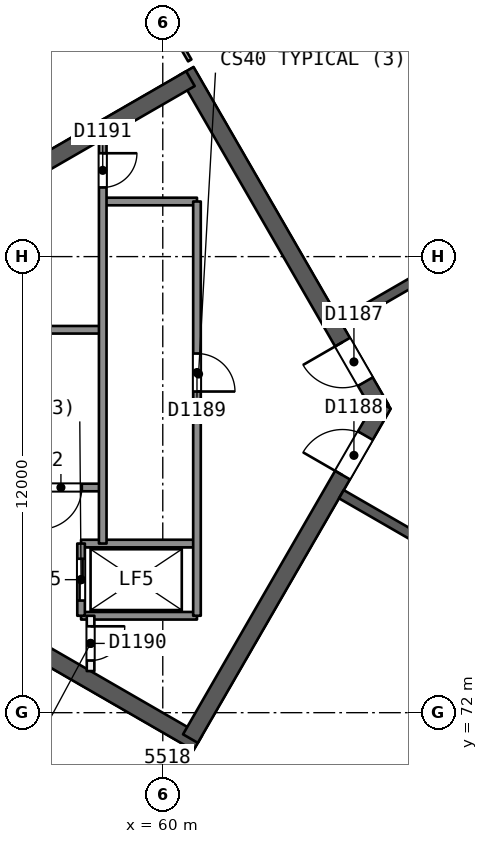
"""IFC4 building model, lengths in metres.
Left out: names, types, materials, properties, quantities, classifications, styles, units other than length and angle.
Written with IfcOpenShell. Run it as: python <this file> out.ifc"""

import sys

from ifc_helpers import new_model, si_unit, direction, frame, frame_2d, origin, place, context, subcontext, project, spatial, rectangle, extrude, element, fill, save


model = new_model("IFC4")
c1 = context("Model", 3, precision=1e-05, world=origin(), true_north=direction((0.0, 1.0)))
c2 = subcontext(c1, "Body", "Model", "MODEL_VIEW")
j1 = project(units=[si_unit("LENGTHUNIT", "METRE"), si_unit("PLANEANGLEUNIT", "RADIAN")], contexts=[c1])
p1 = place(None, origin())
s1 = spatial("IfcSite", under=j1, at=p1, CompositionType="ELEMENT")
p2 = place(p1, origin())
s2 = spatial("IfcBuilding", under=s1, at=p2, CompositionType="ELEMENT")
p3 = place(p2, frame((0.0, 0.0, 224.3)))
s3 = spatial("IfcBuildingStorey", under=s2, at=p3, CompositionType="ELEMENT", Elevation=224.3)
p4 = place(p3, frame((65.74, 80.0, 0.0), z_axis=(0.0, 0.0, 1.0), x_axis=(-0.499991857942, 0.866030104553, 0.0)))
e1 = element("IfcWall", 1, at=p4, inside=s3, PredefinedType="SHEAR", context=c2, shape_type="SweptSolid", body=[
    extrude(rectangle(XDim=10.25, YDim=0.45, at=frame_2d((5.125, 0.0))), origin(), (0.0, 0.0, 1.0), 3.7),
])
p5 = place(p4, frame((0.82, 0.0, 0.0)))
e2 = element("IfcOpeningElement", 2, at=p5, cuts=e1, PredefinedType="OPENING", context=c2, shape_type="SweptSolid", body=[
    extrude(rectangle(XDim=1.2, YDim=2.1, at=frame_2d((0.6, 1.05))), frame((0.0, 0.235, 0.0), z_axis=(0.0, -1.0, 0.0), x_axis=(1.0, 0.0, 0.0)), (0.0, 0.0, 1.0), 0.471),
])
p6 = place(p3, frame((60.728, 88.682, 0.0), z_axis=(0.0, 0.0, 1.0), x_axis=(-0.866021613849, -0.500006564303, 0.0)))
e3 = element("IfcWall", 3, at=p6, inside=s3, PredefinedType="SHEAR", context=c2, shape_type="SweptSolid", body=[
    extrude(rectangle(XDim=14.108, YDim=0.45, at=frame_2d((7.054, 0.0))), origin(), (0.0, 0.0, 1.0), 3.7),
])
p7 = place(p3, frame((48.622, 78.307, 0.0), z_axis=(0.0, 0.0, 1.0), x_axis=(0.86602701116, -0.499997215934, 0.0)))
e4 = element("IfcWall", 4, at=p7, inside=s3, PredefinedType="SHEAR", context=c2, shape_type="SweptSolid", body=[
    extrude(rectangle(XDim=14.204, YDim=0.45, at=frame_2d((7.102, 0.0))), origin(), (0.0, 0.0, 1.0), 3.7),
])
p8 = place(p3, frame((60.728, 71.318, 0.0), z_axis=(0.0, 0.0, 1.0), x_axis=(0.500012416173, 0.866018235185, 0.0)))
e5 = element("IfcWall", 5, at=p8, inside=s3, PredefinedType="SHEAR", context=c2, shape_type="SweptSolid", body=[
    extrude(rectangle(XDim=10.155, YDim=0.45, at=frame_2d((5.078, 0.0))), origin(), (0.0, 0.0, 1.0), 3.7),
])
p9 = place(p8, frame((8.005, 0.0, 0.0)))
e6 = element("IfcOpeningElement", 6, at=p9, cuts=e5, PredefinedType="OPENING", context=c2, shape_type="SweptSolid", body=[
    extrude(rectangle(XDim=1.2, YDim=2.1, at=frame_2d((0.6, 1.05))), frame((0.0, 0.235, 0.0), z_axis=(0.0, -1.0, 0.0), x_axis=(1.0, 0.0, 0.0)), (0.0, 0.0, 1.0), 0.471),
])
p10 = place(p3, frame((78.2, 90.046, 0.0), z_axis=(0.0, 0.0, 1.0), x_axis=(-0.866026492143, -0.499998114903, 0.0)))
e7 = element("IfcWall", 7, at=p10, inside=s3, PredefinedType="SHEAR", context=c2, shape_type="SweptSolid", body=[
    extrude(rectangle(XDim=15.588, YDim=0.25, at=frame_2d((7.794, 0.0))), origin(), (0.0, 0.0, 1.0), 3.3),
])
p11 = place(p10, frame((2.15, 0.0, 0.0)))
e8 = element("IfcOpeningElement", 8, at=p11, cuts=e7, PredefinedType="OPENING", context=c2, shape_type="SweptSolid", body=[
    extrude(rectangle(XDim=1.0, YDim=2.1, at=frame_2d((0.5, 1.05))), frame((0.0, 0.135, 0.0), z_axis=(0.0, -1.0, 0.0), x_axis=(1.0, 0.0, 0.0)), (0.0, 0.0, 1.0), 0.271),
])
p12 = place(p10, frame((8.538, 0.0, 0.0)))
e9 = element("IfcOpeningElement", 9, at=p12, cuts=e7, PredefinedType="OPENING", context=c2, shape_type="SweptSolid", body=[
    extrude(rectangle(XDim=1.1, YDim=2.1, at=frame_2d((0.55, 1.05))), frame((0.0, 0.135, 0.0), z_axis=(0.0, -1.0, 0.0), x_axis=(1.0, 0.0, 0.0)), (0.0, 0.0, 1.0), 0.271),
])
p13 = place(p10, frame((12.282, 0.0, 0.0)))
e10 = element("IfcOpeningElement", 10, at=p13, cuts=e7, PredefinedType="OPENING", context=c2, shape_type="SweptSolid", body=[
    extrude(rectangle(XDim=1.0, YDim=2.1, at=frame_2d((0.5, 1.05))), frame((0.0, 0.135, 0.0), z_axis=(0.0, -1.0, 0.0), x_axis=(1.0, 0.0, 0.0)), (0.0, 0.0, 1.0), 0.271),
])
p14 = place(p3, frame((64.7, 77.748, 0.0), z_axis=(0.0, 0.0, 1.0), x_axis=(0.866026492143, -0.499998114903, 0.0)))
e11 = element("IfcWall", 11, at=p14, inside=s3, PredefinedType="SHEAR", context=c2, shape_type="SweptSolid", body=[
    extrude(rectangle(XDim=15.588, YDim=0.25, at=frame_2d((7.794, 0.0))), origin(), (0.0, 0.0, 1.0), 3.3),
])
p15 = place(p14, frame((2.462, 0.0, 0.0)))
e12 = element("IfcOpeningElement", 12, at=p15, cuts=e11, PredefinedType="OPENING", context=c2, shape_type="SweptSolid", body=[
    extrude(rectangle(XDim=1.0, YDim=2.1, at=frame_2d((0.5, 1.05))), frame((0.0, 0.135, 0.0), z_axis=(0.0, -1.0, 0.0), x_axis=(1.0, 0.0, 0.0)), (0.0, 0.0, 1.0), 0.271),
])
p16 = place(p14, frame((9.474, 0.0, 0.0)))
e13 = element("IfcOpeningElement", 13, at=p16, cuts=e11, PredefinedType="OPENING", context=c2, shape_type="SweptSolid", body=[
    extrude(rectangle(XDim=1.1, YDim=2.1, at=frame_2d((0.55, 1.05))), frame((0.0, 0.135, 0.0), z_axis=(0.0, -1.0, 0.0), x_axis=(1.0, 0.0, 0.0)), (0.0, 0.0, 1.0), 0.271),
])
p17 = place(p14, frame((12.906, 0.0, 0.0)))
e14 = element("IfcOpeningElement", 14, at=p17, cuts=e11, PredefinedType="OPENING", context=c2, shape_type="SweptSolid", body=[
    extrude(rectangle(XDim=1.0, YDim=2.1, at=frame_2d((0.5, 1.05))), frame((0.0, 0.135, 0.0), z_axis=(0.0, -1.0, 0.0), x_axis=(1.0, 0.0, 0.0)), (0.0, 0.0, 1.0), 0.271),
])
p18 = place(p3, frame((64.396, 94.002, 0.0), z_axis=(0.0, 0.0, 1.0), x_axis=(0.50001095942, -0.866019076268, 0.0)))
e15 = element("IfcWall", 15, at=p18, inside=s3, PredefinedType="PARTITIONING", context=c2, shape_type="SweptSolid", body=[
    extrude(rectangle(XDim=10.328, YDim=0.2, at=frame_2d((5.164, 0.0))), origin(), (0.0, 0.0, 1.0), 3.3),
])
p19 = place(p3, frame((59.536, 91.196, 0.0), z_axis=(0.0, 0.0, 1.0), x_axis=(0.499950341091, -0.86605407247, 0.0)))
e16 = element("IfcWall", 16, at=p19, inside=s3, PredefinedType="PARTITIONING", context=c2, shape_type="SweptSolid", body=[
    extrude(rectangle(XDim=2.349, YDim=0.1, at=frame_2d((1.175, 0.0))), origin(), (0.0, 0.0, 1.0), 3.3),
])
p20 = place(p19, frame((0.725, 0.0, 0.0)))
e17 = element("IfcOpeningElement", 17, at=p20, cuts=e16, PredefinedType="OPENING", context=c2, shape_type="SweptSolid", body=[
    extrude(rectangle(XDim=0.9, YDim=2.1, at=frame_2d((0.45, 1.05))), frame((0.0, 0.061, 0.0), z_axis=(0.0, -1.0, 0.0), x_axis=(1.0, 0.0, 0.0)), (0.0, 0.0, 1.0), 0.121),
])
p21 = place(p3, frame((60.71, 70.838, 0.0), z_axis=(0.0, 0.0, 1.0), x_axis=(-0.499950341091, -0.86605407247, 0.0)))
e18 = element("IfcWall", 18, at=p21, inside=s3, PredefinedType="PARTITIONING", context=c2, shape_type="SweptSolid", body=[
    extrude(rectangle(XDim=2.349, YDim=0.1, at=frame_2d((1.175, 0.0))), origin(), (0.0, 0.0, 1.0), 3.3),
])
p22 = place(p21, frame((0.725, 0.0, 0.0)))
e19 = element("IfcOpeningElement", 19, at=p22, cuts=e18, PredefinedType="OPENING", context=c2, shape_type="SweptSolid", body=[
    extrude(rectangle(XDim=0.9, YDim=2.1, at=frame_2d((0.45, 1.05))), frame((0.0, 0.061, 0.0), z_axis=(0.0, -1.0, 0.0), x_axis=(1.0, 0.0, 0.0)), (0.0, 0.0, 1.0), 0.121),
])
p23 = place(p3, frame((64.666, 65.842, 0.0), z_axis=(0.0, 0.0, 1.0), x_axis=(0.500019482754, 0.866014155119, 0.0)))
e20 = element("IfcWall", 20, at=p23, inside=s3, PredefinedType="PARTITIONING", context=c2, shape_type="SweptSolid", body=[
    extrude(rectangle(XDim=7.328, YDim=0.2, at=frame_2d((3.664, 0.0))), origin(), (0.0, 0.0, 1.0), 3.3),
])
p24 = place(p3, frame((44.324, 82.585, 0.0), z_axis=(0.0, 0.0, 1.0), x_axis=(0.86602584856, 0.499999229625, 0.0)))
e21 = element("IfcWall", 21, at=p24, inside=s3, PredefinedType="SOLIDWALL", context=c2, shape_type="SweptSolid", body=[
    extrude(rectangle(XDim=50.547, YDim=0.3, at=frame_2d((25.274, 0.0))), origin(), (0.0, 0.0, 1.0), 3.3),
])
p25 = place(p24, frame((24.23, 0.0, 0.0)))
e22 = element("IfcOpeningElement", 22, at=p25, cuts=e21, PredefinedType="OPENING", context=c2, shape_type="SweptSolid", body=[
    extrude(rectangle(XDim=2.4, YDim=2.4, at=frame_2d((1.2, 1.2))), frame((0.0, 0.161, 0.0), z_axis=(0.0, -1.0, 0.0), x_axis=(1.0, 0.0, 0.0)), (0.0, 0.0, 1.0), 0.321),
])
p26 = place(p24, frame((29.218, 0.0, 0.0)))
e23 = element("IfcOpeningElement", 23, at=p26, cuts=e21, PredefinedType="OPENING", context=c2, shape_type="SweptSolid", body=[
    extrude(rectangle(XDim=2.4, YDim=2.4, at=frame_2d((1.2, 1.2))), frame((0.0, 0.161, 0.0), z_axis=(0.0, -1.0, 0.0), x_axis=(1.0, 0.0, 0.0)), (0.0, 0.0, 1.0), 0.321),
])
p27 = place(p24, frame((39.328, 0.0, 0.0)))
e24 = element("IfcOpeningElement", 24, at=p27, cuts=e21, PredefinedType="OPENING", context=c2, shape_type="SweptSolid", body=[
    extrude(rectangle(XDim=2.4, YDim=2.4, at=frame_2d((1.2, 1.2))), frame((0.0, 0.161, 0.0), z_axis=(0.0, -1.0, 0.0), x_axis=(1.0, 0.0, 0.0)), (0.0, 0.0, 1.0), 0.321),
])
p28 = place(p24, frame((19.085, 0.0, 0.0)))
e25 = element("IfcOpeningElement", 25, at=p28, cuts=e21, PredefinedType="OPENING", context=c2, shape_type="SweptSolid", body=[
    extrude(rectangle(XDim=2.4, YDim=2.4, at=frame_2d((1.2, 1.2))), frame((0.0, 0.161, 0.0), z_axis=(0.0, -1.0, 0.0), x_axis=(1.0, 0.0, 0.0)), (0.0, 0.0, 1.0), 0.321),
])
p29 = place(p24, frame((8.771, 0.0, 0.0)))
e26 = element("IfcOpeningElement", 26, at=p29, cuts=e21, PredefinedType="OPENING", context=c2, shape_type="SweptSolid", body=[
    extrude(rectangle(XDim=2.4, YDim=2.4, at=frame_2d((1.2, 1.2))), frame((0.0, 0.161, 0.0), z_axis=(0.0, -1.0, 0.0), x_axis=(1.0, 0.0, 0.0)), (0.0, 0.0, 1.0), 0.321),
])
p30 = place(p3, frame((88.099, 52.141, 0.0), z_axis=(0.0, 0.0, 1.0), x_axis=(-0.86602584856, 0.499999229625, 0.0)))
e27 = element("IfcWall", 27, at=p30, inside=s3, PredefinedType="SOLIDWALL", context=c2, shape_type="SweptSolid", body=[
    extrude(rectangle(XDim=50.547, YDim=0.3, at=frame_2d((25.274, 0.0))), origin(), (0.0, 0.0, 1.0), 3.3),
])
p31 = place(p30, frame((23.294, 0.0, 0.0)))
e28 = element("IfcOpeningElement", 28, at=p31, cuts=e27, PredefinedType="OPENING", context=c2, shape_type="SweptSolid", body=[
    extrude(rectangle(XDim=2.4, YDim=2.4, at=frame_2d((1.2, 1.2))), frame((0.0, 0.161, 0.0), z_axis=(0.0, -1.0, 0.0), x_axis=(1.0, 0.0, 0.0)), (0.0, 0.0, 1.0), 0.321),
])
p32 = place(p30, frame((28.906, 0.0, 0.0)))
e29 = element("IfcOpeningElement", 29, at=p32, cuts=e27, PredefinedType="OPENING", context=c2, shape_type="SweptSolid", body=[
    extrude(rectangle(XDim=2.4, YDim=2.4, at=frame_2d((1.2, 1.2))), frame((0.0, 0.161, 0.0), z_axis=(0.0, -1.0, 0.0), x_axis=(1.0, 0.0, 0.0)), (0.0, 0.0, 1.0), 0.321),
])
p33 = place(p30, frame((39.328, 0.0, 0.0)))
e30 = element("IfcOpeningElement", 30, at=p33, cuts=e27, PredefinedType="OPENING", context=c2, shape_type="SweptSolid", body=[
    extrude(rectangle(XDim=2.4, YDim=2.4, at=frame_2d((1.2, 1.2))), frame((0.0, 0.161, 0.0), z_axis=(0.0, -1.0, 0.0), x_axis=(1.0, 0.0, 0.0)), (0.0, 0.0, 1.0), 0.321),
])
p34 = place(p30, frame((18.462, 0.0, 0.0)))
e31 = element("IfcOpeningElement", 31, at=p34, cuts=e27, PredefinedType="OPENING", context=c2, shape_type="SweptSolid", body=[
    extrude(rectangle(XDim=2.4, YDim=2.4, at=frame_2d((1.2, 1.2))), frame((0.0, 0.161, 0.0), z_axis=(0.0, -1.0, 0.0), x_axis=(1.0, 0.0, 0.0)), (0.0, 0.0, 1.0), 0.321),
])
p35 = place(p30, frame((8.771, 0.0, 0.0)))
e32 = element("IfcOpeningElement", 32, at=p35, cuts=e27, PredefinedType="OPENING", context=c2, shape_type="SweptSolid", body=[
    extrude(rectangle(XDim=2.4, YDim=2.4, at=frame_2d((1.2, 1.2))), frame((0.0, 0.161, 0.0), z_axis=(0.0, -1.0, 0.0), x_axis=(1.0, 0.0, 0.0)), (0.0, 0.0, 1.0), 0.321),
])
p36 = place(p3, frame((60.9, 85.45, 0.0), z_axis=(0.0, 0.0, 1.0), x_axis=(-1.0, 0.0, 0.0)))
e33 = element("IfcWall", 33, at=p36, inside=s3, PredefinedType="SOLIDWALL", context=c2, shape_type="SweptSolid", body=[
    extrude(rectangle(XDim=2.48, YDim=0.2, at=frame_2d((1.24, 0.0))), origin(), (0.0, 0.0, 1.0), 3.3),
])
p37 = place(p3, frame((58.42, 82.075, 0.0), z_axis=(0.0, 0.0, 1.0), x_axis=(-1.0, 0.0, 0.0)))
e34 = element("IfcWall", 34, at=p37, inside=s3, PredefinedType="SOLIDWALL", context=c2, shape_type="SweptSolid", body=[
    extrude(rectangle(XDim=7.7, YDim=0.2, at=frame_2d((3.85, 0.0))), origin(), (0.0, 0.0, 1.0), 3.3),
])
p38 = place(p3, frame((58.42, 77.925, 0.0), z_axis=(0.0, 0.0, 1.0), x_axis=(-1.0, 0.0, 0.0)))
e35 = element("IfcWall", 35, at=p38, inside=s3, PredefinedType="SOLIDWALL", context=c2, shape_type="SweptSolid", body=[
    extrude(rectangle(XDim=7.7, YDim=0.2, at=frame_2d((3.85, 0.0))), origin(), (0.0, 0.0, 1.0), 3.3),
])
p39 = place(p38, frame((0.55, 0.0, 0.0)))
e36 = element("IfcOpeningElement", 36, at=p39, cuts=e35, PredefinedType="OPENING", context=c2, shape_type="SweptSolid", body=[
    extrude(rectangle(XDim=1.1, YDim=2.1, at=frame_2d((0.55, 1.05))), frame((0.0, 0.11, 0.0), z_axis=(0.0, -1.0, 0.0), x_axis=(1.0, 0.0, 0.0)), (0.0, 0.0, 1.0), 0.221),
])
for number, where, z_axis, x_axis in (
    (37, (60.9, 76.45, 0.0), (0.0, 0.0, 1.0), (-1.0, 0.0, 0.0)),
    (38, (60.9, 74.55, 0.0), (0.0, 0.0, 1.0), (-1.0, 0.0, 0.0)),
):
    element("IfcWall", number, at=place(p3, frame(where, z_axis=z_axis, x_axis=x_axis)), inside=s3, PredefinedType="SOLIDWALL", context=c2, shape_type="SweptSolid", body=[
        extrude(rectangle(XDim=3.05, YDim=0.2, at=frame_2d((1.525, 0.0))), origin(), (0.0, 0.0, 1.0), 3.3),
    ])
p40 = place(p3, frame((60.9, 85.45, 0.0), z_axis=(0.0, 0.0, 1.0), x_axis=(0.0, -1.0, 0.0)))
e39 = element("IfcWall", 39, at=p40, inside=s3, PredefinedType="SOLIDWALL", context=c2, shape_type="SweptSolid", body=[
    extrude(rectangle(XDim=10.9, YDim=0.2, at=frame_2d((5.45, 0.0))), origin(), (0.0, 0.0, 1.0), 3.3),
])
p41 = place(p40, frame((4.0, 0.0, 0.0)))
e40 = element("IfcOpeningElement", 40, at=p41, cuts=e39, PredefinedType="OPENING", context=c2, shape_type="SweptSolid", body=[
    extrude(rectangle(XDim=1.0, YDim=2.1, at=frame_2d((0.5, 1.05))), frame((0.0, 0.11, 0.0), z_axis=(0.0, -1.0, 0.0), x_axis=(1.0, 0.0, 0.0)), (0.0, 0.0, 1.0), 0.221),
])
p42 = place(p3, frame((58.42, 87.09, 0.0), z_axis=(0.0, 0.0, 1.0), x_axis=(0.0, -1.0, 0.0)))
e41 = element("IfcWall", 41, at=p42, inside=s3, PredefinedType="SOLIDWALL", context=c2, shape_type="SweptSolid", body=[
    extrude(rectangle(XDim=10.64, YDim=0.2, at=frame_2d((5.32, 0.0))), origin(), (0.0, 0.0, 1.0), 3.3),
])
p43 = place(p42, frame((0.37, 0.0, 0.0)))
e42 = element("IfcOpeningElement", 42, at=p43, cuts=e41, PredefinedType="OPENING", context=c2, shape_type="SweptSolid", body=[
    extrude(rectangle(XDim=0.9, YDim=2.1, at=frame_2d((0.45, 1.05))), frame((0.0, 0.11, 0.0), z_axis=(0.0, -1.0, 0.0), x_axis=(1.0, 0.0, 0.0)), (0.0, 0.0, 1.0), 0.221),
])
p44 = place(p3, frame((58.1, 74.55, 0.0), z_axis=(0.0, 0.0, 1.0), x_axis=(0.0, -1.0, 0.0)))
e43 = element("IfcWall", 43, at=p44, inside=s3, PredefinedType="PARTITIONING", context=c2, shape_type="SweptSolid", body=[
    extrude(rectangle(XDim=1.455, YDim=0.2, at=frame_2d((0.728, 0.0))), origin(), (0.0, 0.0, 1.0), 3.3),
])
p45 = place(p44, frame((0.278, 0.0, 0.0)))
e44 = element("IfcOpeningElement", 44, at=p45, cuts=e43, PredefinedType="OPENING", context=c2, shape_type="SweptSolid", body=[
    extrude(rectangle(XDim=0.9, YDim=2.1, at=frame_2d((0.45, 1.05))), frame((0.0, 0.11, 0.0), z_axis=(0.0, -1.0, 0.0), x_axis=(1.0, 0.0, 0.0)), (0.0, 0.0, 1.0), 0.221),
])
p46 = place(p3, frame((57.85, 76.45, 0.0), z_axis=(0.0, 0.0, 1.0), x_axis=(0.0, -1.0, 0.0)))
e45 = element("IfcWall", 45, at=p46, inside=s3, PredefinedType="SOLIDWALL", context=c2, shape_type="SweptSolid", body=[
    extrude(rectangle(XDim=1.9, YDim=0.2, at=frame_2d((0.95, 0.0))), origin(), (0.0, 0.0, 1.0), 3.3),
])
p47 = place(p46, frame((0.4, 0.0, 0.0)))
e46 = element("IfcOpeningElement", 46, at=p47, cuts=e45, PredefinedType="OPENING", context=c2, shape_type="SweptSolid", body=[
    extrude(rectangle(XDim=1.1, YDim=2.1, at=frame_2d((0.55, 1.05))), frame((0.0, 0.11, 0.0), z_axis=(0.0, -1.0, 0.0), x_axis=(1.0, 0.0, 0.0)), (0.0, 0.0, 1.0), 0.221),
])
p48 = place(p5, origin())
e47 = element("IfcDoor", 47, at=p48, inside=s3, OperationType="SINGLE_SWING_RIGHT", PredefinedType="NOTDEFINED", context=c2, shape_type="SweptSolid", body=[
    extrude(rectangle(XDim=1.2, YDim=2.1, at=frame_2d((0.6, 1.05))), frame((0.0, 0.025, 0.0), z_axis=(0.0, -1.0, 0.0), x_axis=(1.0, 0.0, 0.0)), (0.0, 0.0, 1.0), 0.05),
])
fill(e2, e47)
p49 = place(p9, origin())
e48 = element("IfcDoor", 48, at=p49, inside=s3, OperationType="SINGLE_SWING_LEFT", PredefinedType="NOTDEFINED", context=c2, shape_type="SweptSolid", body=[
    extrude(rectangle(XDim=1.2, YDim=2.1, at=frame_2d((0.6, 1.05))), frame((0.0, 0.025, 0.0), z_axis=(0.0, -1.0, 0.0), x_axis=(1.0, 0.0, 0.0)), (0.0, 0.0, 1.0), 0.05),
])
fill(e6, e48)
p50 = place(p47, origin())
e49 = element("IfcDoor", 49, at=p50, inside=s3, OperationType="SLIDING_TO_RIGHT", PredefinedType="NOTDEFINED", context=c2, shape_type="SweptSolid", body=[
    extrude(rectangle(XDim=1.1, YDim=2.1, at=frame_2d((0.55, 1.05))), frame((0.0, 0.025, 0.0), z_axis=(0.0, -1.0, 0.0), x_axis=(1.0, 0.0, 0.0)), (0.0, 0.0, 1.0), 0.05),
])
fill(e46, e49)
p51 = place(p41, origin())
e50 = element("IfcDoor", 50, at=p51, inside=s3, OperationType="SINGLE_SWING_RIGHT", PredefinedType="NOTDEFINED", context=c2, shape_type="SweptSolid", body=[
    extrude(rectangle(XDim=1.0, YDim=2.1, at=frame_2d((0.5, 1.05))), frame((0.0, 0.025, 0.0), z_axis=(0.0, -1.0, 0.0), x_axis=(1.0, 0.0, 0.0)), (0.0, 0.0, 1.0), 0.05),
])
fill(e40, e50)
p52 = place(p45, origin())
e51 = element("IfcDoor", 51, at=p52, inside=s3, OperationType="SINGLE_SWING_LEFT", PredefinedType="NOTDEFINED", context=c2, shape_type="SweptSolid", body=[
    extrude(rectangle(XDim=0.9, YDim=2.1, at=frame_2d((0.45, 1.05))), frame((0.0, 0.025, 0.0), z_axis=(0.0, -1.0, 0.0), x_axis=(1.0, 0.0, 0.0)), (0.0, 0.0, 1.0), 0.05),
])
fill(e44, e51)
p53 = place(p43, origin())
e52 = element("IfcDoor", 52, at=p53, inside=s3, OperationType="SINGLE_SWING_LEFT", PredefinedType="NOTDEFINED", context=c2, shape_type="SweptSolid", body=[
    extrude(rectangle(XDim=0.9, YDim=2.1, at=frame_2d((0.45, 1.05))), frame((0.0, 0.025, 0.0), z_axis=(0.0, -1.0, 0.0), x_axis=(1.0, 0.0, 0.0)), (0.0, 0.0, 1.0), 0.05),
])
fill(e42, e52)
p54 = place(p39, origin())
e53 = element("IfcDoor", 53, at=p54, inside=s3, OperationType="SINGLE_SWING_RIGHT", PredefinedType="NOTDEFINED", context=c2, shape_type="SweptSolid", body=[
    extrude(rectangle(XDim=1.1, YDim=2.1, at=frame_2d((0.55, 1.05))), frame((0.0, 0.025, 0.0), z_axis=(0.0, -1.0, 0.0), x_axis=(1.0, 0.0, 0.0)), (0.0, 0.0, 1.0), 0.05),
])
fill(e36, e53)
save(model, sys.argv[1])
